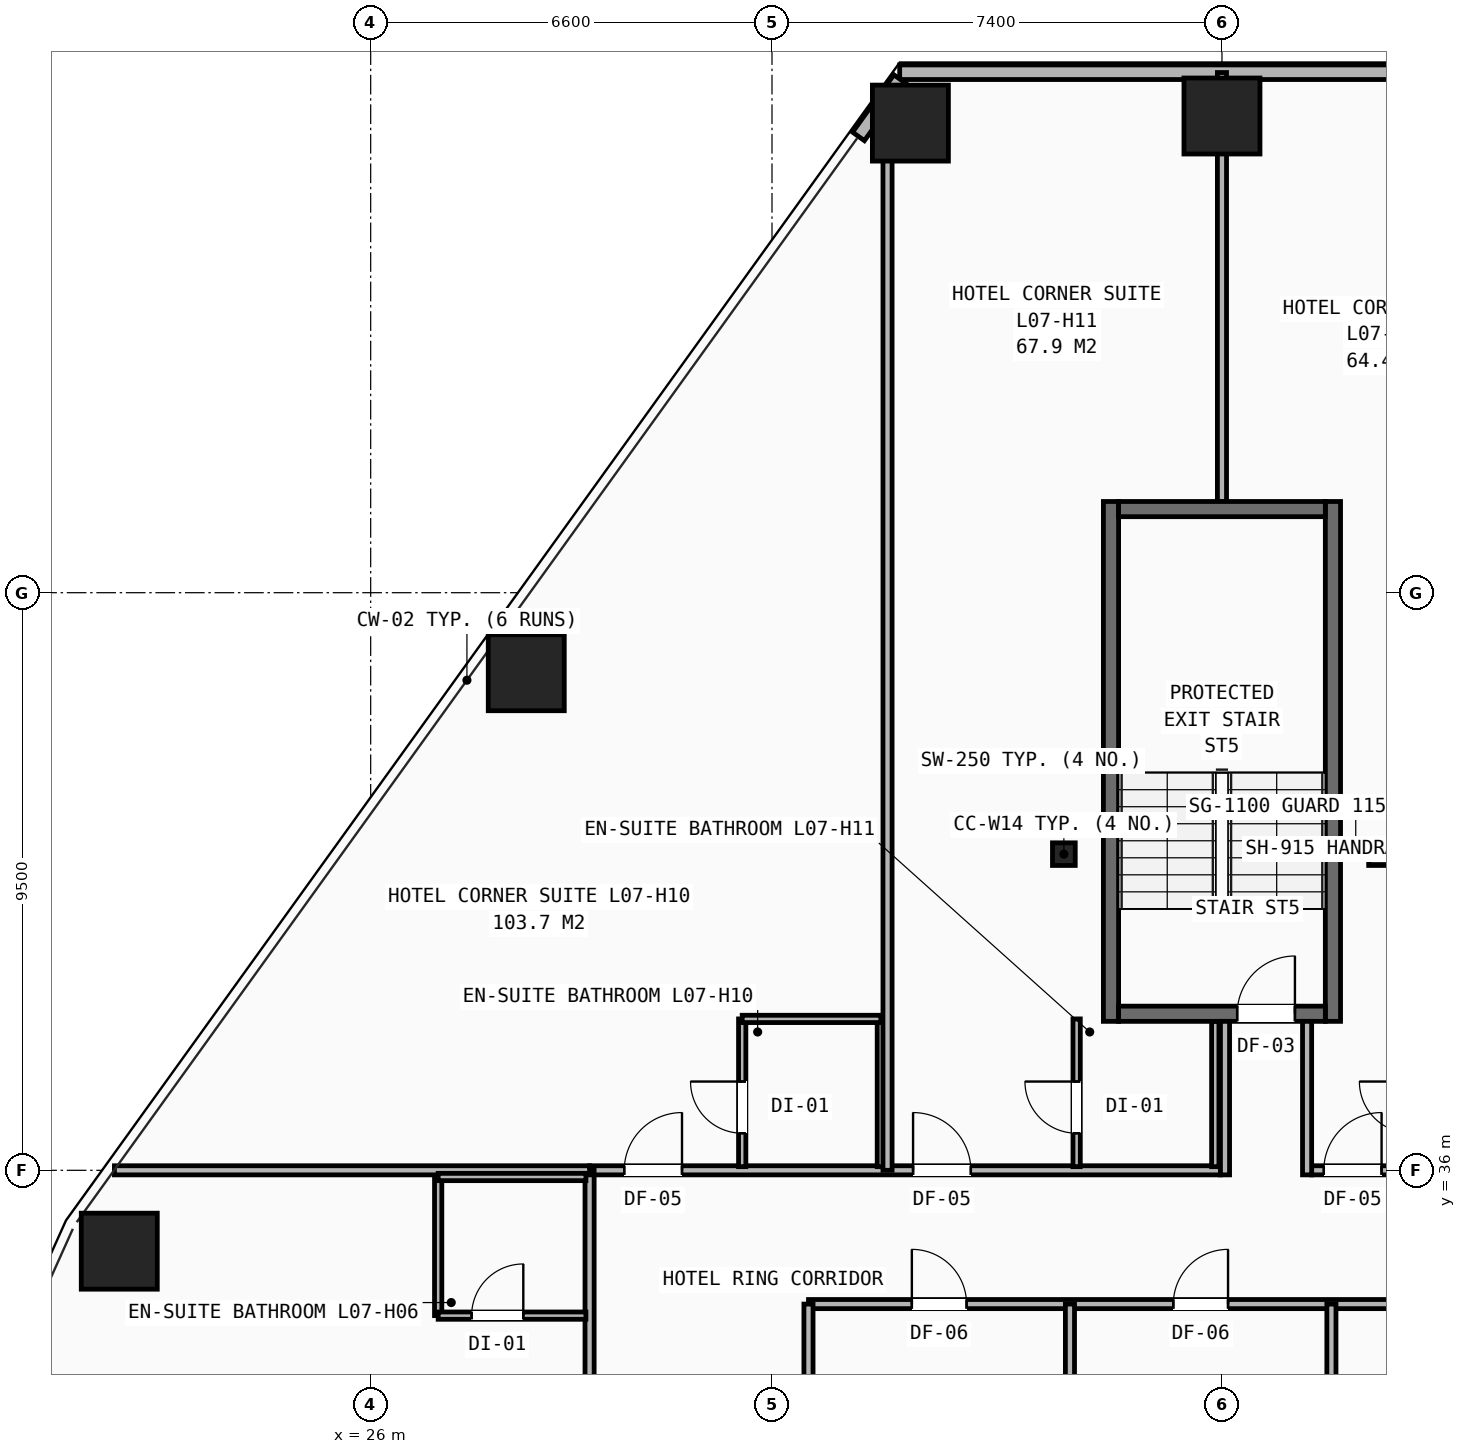
"""IFC4 building model, lengths in metres.
Left out: names, types, materials, properties, quantities, classifications, styles, units other than length and angle.
Written with IfcOpenShell. Run it as: python <this file> out.ifc"""

import sys

from ifc_helpers import new_model, si_unit, direction, frame, frame_2d, origin, origin_2d, place, context, subcontext, project, spatial, rectangle, hollow_rectangle, i_section, extrude, element, fill, save


model = new_model("IFC4")
c1 = context("Model", 3, precision=1e-05, world=origin(), true_north=direction((0.0, 1.0)))
c2 = subcontext(c1, "Body", "Model", "MODEL_VIEW")
j1 = project(units=[si_unit("LENGTHUNIT", "METRE"), si_unit("PLANEANGLEUNIT", "RADIAN")], contexts=[c1])
p1 = place(None, origin())
s1 = spatial("IfcSite", under=j1, at=p1, CompositionType="ELEMENT")
p2 = place(p1, origin())
s2 = spatial("IfcBuilding", under=s1, at=p2, CompositionType="ELEMENT")
p3 = place(p2, frame((0.0, 0.0, 30.4)))
s3 = spatial("IfcBuildingStorey", under=s2, at=p3, CompositionType="ELEMENT", Elevation=30.4)
for number, where, z_axis, x_axis in (
    (1, (37.4, 41.2, 0.0), (0.0, 0.0, 1.0), (1.0, 0.0, 0.0)),
    (2, (42.6, 41.2, 0.0), (0.0, 0.0, 1.0), (1.0, 0.0, 0.0)),
):
    element("IfcColumn", number, at=place(p3, frame(where, z_axis=z_axis, x_axis=x_axis)), inside=s3, PredefinedType="COLUMN", context=c2, shape_type="SweptSolid", body=[
        extrude(i_section(OverallWidth=0.374, OverallDepth=0.372, WebThickness=0.016, FlangeThickness=0.026, at=origin_2d()), origin(), (0.0, 0.0, 1.0), 3.2),
    ])
for number, where, z_axis, x_axis in (
    (3, (40.0, 53.34, 0.0), (0.0, 0.0, 1.0), (1.0, 0.0, 0.0)),
    (4, (34.876, 53.223, 0.0), (0.0, 0.0, 1.0), (1.0, 0.0, 0.0)),
    (5, (28.559, 44.184, 0.0), (0.0, 0.0, 1.0), (1.0, 0.0, 0.0)),
    (6, (21.865, 34.67, 0.0), (0.0, 0.0, 1.0), (1.0, 0.0, 0.0)),
):
    element("IfcColumn", number, at=place(p3, frame(where, z_axis=z_axis, x_axis=x_axis)), inside=s3, PredefinedType="COLUMN", context=c2, shape_type="SweptSolid", body=[
        extrude(hollow_rectangle(XDim=1.25, YDim=1.25, WallThickness=0.08, at=origin_2d()), origin(), (0.0, 0.0, 1.0), 3.2),
    ])
p4 = place(p3, frame((34.7, 54.06, 0.0), z_axis=(0.0, 0.0, 1.0), x_axis=(1.0, 0.0, 0.0)))
e7 = element("IfcWall", 7, at=p4, inside=s3, PredefinedType="SHEAR", context=c2, shape_type="SweptSolid", body=[
    extrude(rectangle(XDim=10.6, YDim=0.24, at=frame_2d((5.3, 0.0))), origin(), (0.0, 0.0, 1.0), 2.263),
])
p5 = place(p3, frame((34.701, 53.948, 0.0), z_axis=(0.0, 0.0, 1.0), x_axis=(-0.584293660118, -0.811542308661, 0.0)))
e8 = element("IfcWall", 8, at=p5, inside=s3, PredefinedType="SHEAR", context=c2, shape_type="SweptSolid", body=[
    extrude(rectangle(XDim=1.162, YDim=0.24, at=frame_2d((0.581, 0.0))), origin(), (0.0, 0.0, 1.0), 2.263),
])
p6 = place(p3, frame((33.2, 33.8, 0.0), z_axis=(0.0, 0.0, 1.0), x_axis=(1.0, 0.0, 0.0)))
e9 = element("IfcWall", 9, at=p6, inside=s3, PredefinedType="PARTITIONING", context=c2, shape_type="SweptSolid", body=[
    extrude(rectangle(XDim=13.0, YDim=0.15, at=frame_2d((6.5, 0.0))), origin(), (0.0, 0.0, 1.0), 2.98),
])
p7 = place(p6, frame((1.7, 0.0, 0.0)))
e10 = element("IfcOpeningElement", 10, at=p7, cuts=e9, PredefinedType="OPENING", context=c2, shape_type="SweptSolid", body=[
    extrude(rectangle(XDim=0.9, YDim=2.1, at=frame_2d((0.45, 1.05))), frame((0.0, 0.085, 0.0), z_axis=(0.0, -1.0, 0.0), x_axis=(1.0, 0.0, 0.0)), (0.0, 0.0, 1.0), 0.17),
])
p8 = place(p6, frame((6.0, 0.0, 0.0)))
e11 = element("IfcOpeningElement", 11, at=p8, cuts=e9, PredefinedType="OPENING", context=c2, shape_type="SweptSolid", body=[
    extrude(rectangle(XDim=0.9, YDim=2.1, at=frame_2d((0.45, 1.05))), frame((0.0, 0.085, 0.0), z_axis=(0.0, -1.0, 0.0), x_axis=(1.0, 0.0, 0.0)), (0.0, 0.0, 1.0), 0.17),
])
p9 = place(p6, frame((10.35, 0.0, 0.0)))
e12 = element("IfcOpeningElement", 12, at=p9, cuts=e9, PredefinedType="OPENING", context=c2, shape_type="SweptSolid", body=[
    extrude(rectangle(XDim=0.9, YDim=2.1, at=frame_2d((0.45, 1.05))), frame((0.0, 0.085, 0.0), z_axis=(0.0, -1.0, 0.0), x_axis=(1.0, 0.0, 0.0)), (0.0, 0.0, 1.0), 0.17),
])
for number, where, z_axis, x_axis in (
    (13, (33.2, 31.2, 0.0), (0.0, 0.0, 1.0), (0.0, 1.0, 0.0)),
    (14, (37.5, 31.2, 0.0), (0.0, 0.0, 1.0), (0.0, 1.0, 0.0)),
    (15, (41.8, 31.2, 0.0), (0.0, 0.0, 1.0), (0.0, 1.0, 0.0)),
):
    element("IfcWall", number, at=place(p3, frame(where, z_axis=z_axis, x_axis=x_axis)), inside=s3, PredefinedType="PARTITIONING", context=c2, shape_type="SweptSolid", body=[
        extrude(rectangle(XDim=2.6, YDim=0.15, at=frame_2d((1.3, 0.0))), origin(), (0.0, 0.0, 1.0), 2.431),
    ])
p10 = place(p3, frame((29.6, 36.0, 0.0), z_axis=(0.0, 0.0, 1.0), x_axis=(1.0, 0.0, 0.0)))
e16 = element("IfcWall", 16, at=p10, inside=s3, PredefinedType="PARTITIONING", context=c2, shape_type="SweptSolid", body=[
    extrude(rectangle(XDim=10.375, YDim=0.15, at=frame_2d((5.188, 0.0))), origin(), (0.0, 0.0, 1.0), 2.98),
])
p11 = place(p10, frame((0.57, 0.0, 0.0)))
e17 = element("IfcOpeningElement", 17, at=p11, cuts=e16, PredefinedType="OPENING", context=c2, shape_type="SweptSolid", body=[
    extrude(rectangle(XDim=0.95, YDim=2.1, at=frame_2d((0.475, 1.05))), frame((0.0, 0.085, 0.0), z_axis=(0.0, -1.0, 0.0), x_axis=(1.0, 0.0, 0.0)), (0.0, 0.0, 1.0), 0.17),
])
p12 = place(p10, frame((5.32, 0.0, 0.0)))
e18 = element("IfcOpeningElement", 18, at=p12, cuts=e16, PredefinedType="OPENING", context=c2, shape_type="SweptSolid", body=[
    extrude(rectangle(XDim=0.95, YDim=2.1, at=frame_2d((0.475, 1.05))), frame((0.0, 0.085, 0.0), z_axis=(0.0, -1.0, 0.0), x_axis=(1.0, 0.0, 0.0)), (0.0, 0.0, 1.0), 0.17),
])
p13 = place(p3, frame((41.475, 36.0, 0.0), z_axis=(0.0, 0.0, 1.0), x_axis=(1.0, 0.0, 0.0)))
e19 = element("IfcWall", 19, at=p13, inside=s3, PredefinedType="PARTITIONING", context=c2, shape_type="SweptSolid", body=[
    extrude(rectangle(XDim=8.925, YDim=0.15, at=frame_2d((4.462, 0.0))), origin(), (0.0, 0.0, 1.0), 2.513),
])
p14 = place(p13, frame((0.2, 0.0, 0.0)))
e20 = element("IfcOpeningElement", 20, at=p14, cuts=e19, PredefinedType="OPENING", context=c2, shape_type="SweptSolid", body=[
    extrude(rectangle(XDim=0.95, YDim=2.1, at=frame_2d((0.475, 1.05))), frame((0.0, 0.085, 0.0), z_axis=(0.0, -1.0, 0.0), x_axis=(1.0, 0.0, 0.0)), (0.0, 0.0, 1.0), 0.17),
])
p15 = place(p13, frame((4.445, 0.0, 0.0)))
e21 = element("IfcOpeningElement", 21, at=p15, cuts=e19, PredefinedType="OPENING", context=c2, shape_type="SweptSolid", body=[
    extrude(rectangle(XDim=0.95, YDim=2.1, at=frame_2d((0.475, 1.05))), frame((0.0, 0.085, 0.0), z_axis=(0.0, -1.0, 0.0), x_axis=(1.0, 0.0, 0.0)), (0.0, 0.0, 1.0), 0.17),
])
p16 = place(p3, frame((29.6, 14.1, 0.0), z_axis=(0.0, 0.0, 1.0), x_axis=(0.0, 1.0, 0.0)))
e22 = element("IfcWall", 22, at=p16, inside=s3, PredefinedType="PARTITIONING", context=c2, shape_type="SweptSolid", body=[
    extrude(rectangle(XDim=21.9, YDim=0.15, at=frame_2d((10.95, 0.0))), origin(), (0.0, 0.0, 1.0), 2.431),
])
p17 = place(p16, frame((0.42, 0.0, 0.0)))
e23 = element("IfcOpeningElement", 23, at=p17, cuts=e22, PredefinedType="OPENING", context=c2, shape_type="SweptSolid", body=[
    extrude(rectangle(XDim=0.95, YDim=2.1, at=frame_2d((0.475, 1.05))), frame((0.0, 0.085, 0.0), z_axis=(0.0, -1.0, 0.0), x_axis=(1.0, 0.0, 0.0)), (0.0, 0.0, 1.0), 0.17),
])
p18 = place(p16, frame((6.82, 0.0, 0.0)))
e24 = element("IfcOpeningElement", 24, at=p18, cuts=e22, PredefinedType="OPENING", context=c2, shape_type="SweptSolid", body=[
    extrude(rectangle(XDim=0.95, YDim=2.1, at=frame_2d((0.475, 1.05))), frame((0.0, 0.085, 0.0), z_axis=(0.0, -1.0, 0.0), x_axis=(1.0, 0.0, 0.0)), (0.0, 0.0, 1.0), 0.17),
])
p19 = place(p16, frame((14.32, 0.0, 0.0)))
e25 = element("IfcOpeningElement", 25, at=p19, cuts=e22, PredefinedType="OPENING", context=c2, shape_type="SweptSolid", body=[
    extrude(rectangle(XDim=0.95, YDim=2.1, at=frame_2d((0.475, 1.05))), frame((0.0, 0.085, 0.0), z_axis=(0.0, -1.0, 0.0), x_axis=(1.0, 0.0, 0.0)), (0.0, 0.0, 1.0), 0.17),
])
p20 = place(p3, frame((21.786, 36.0, 0.0), z_axis=(0.0, 0.0, 1.0), x_axis=(1.0, 0.0, 0.0)))
e26 = element("IfcWall", 26, at=p20, inside=s3, PredefinedType="PARTITIONING", context=c2, shape_type="SweptSolid", body=[
    extrude(rectangle(XDim=7.814, YDim=0.15, at=frame_2d((3.907, 0.0))), origin(), (0.0, 0.0, 1.0), 2.268),
])
p21 = place(p3, frame((27.11, 33.61, 0.0), z_axis=(0.0, 0.0, 1.0), x_axis=(0.0, 1.0, 0.0)))
e27 = element("IfcWall", 27, at=p21, inside=s3, PredefinedType="PARTITIONING", context=c2, shape_type="SweptSolid", body=[
    extrude(rectangle(XDim=2.28, YDim=0.12, at=frame_2d((1.14, 0.0))), origin(), (0.0, 0.0, 1.0), 2.513),
])
p22 = place(p3, frame((27.11, 33.61, 0.0), z_axis=(0.0, 0.0, 1.0), x_axis=(1.0, 0.0, 0.0)))
e28 = element("IfcWall", 28, at=p22, inside=s3, PredefinedType="PARTITIONING", context=c2, shape_type="SweptSolid", body=[
    extrude(rectangle(XDim=2.43, YDim=0.12, at=frame_2d((1.215, 0.0))), origin(), (0.0, 0.0, 1.0), 2.98),
])
p23 = place(p22, frame((0.55, 0.0, 0.0)))
e29 = element("IfcOpeningElement", 29, at=p23, cuts=e28, PredefinedType="OPENING", context=c2, shape_type="SweptSolid", body=[
    extrude(rectangle(XDim=0.85, YDim=2.05, at=frame_2d((0.425, 1.025))), frame((0.0, 0.07, 0.0), z_axis=(0.0, -1.0, 0.0), x_axis=(1.0, 0.0, 0.0)), (0.0, 0.0, 1.0), 0.14),
])
p24 = place(p3, frame((27.11, 35.89, 0.0), z_axis=(0.0, 0.0, 1.0), x_axis=(1.0, 0.0, 0.0)))
e30 = element("IfcWall", 30, at=p24, inside=s3, PredefinedType="PARTITIONING", context=c2, shape_type="SweptSolid", body=[
    extrude(rectangle(XDim=2.43, YDim=0.12, at=frame_2d((1.215, 0.0))), origin(), (0.0, 0.0, 1.0), 2.513),
])
p25 = place(p3, frame((32.11, 36.06, 0.0), z_axis=(0.0, 0.0, 1.0), x_axis=(0.0, 1.0, 0.0)))
e31 = element("IfcWall", 31, at=p25, inside=s3, PredefinedType="PARTITIONING", context=c2, shape_type="SweptSolid", body=[
    extrude(rectangle(XDim=2.43, YDim=0.12, at=frame_2d((1.215, 0.0))), origin(), (0.0, 0.0, 1.0), 2.98),
])
p26 = place(p25, frame((0.55, 0.0, 0.0)))
e32 = element("IfcOpeningElement", 32, at=p26, cuts=e31, PredefinedType="OPENING", context=c2, shape_type="SweptSolid", body=[
    extrude(rectangle(XDim=0.85, YDim=2.05, at=frame_2d((0.425, 1.025))), frame((0.0, 0.07, 0.0), z_axis=(0.0, -1.0, 0.0), x_axis=(1.0, 0.0, 0.0)), (0.0, 0.0, 1.0), 0.14),
])
p27 = place(p3, frame((34.39, 36.06, 0.0), z_axis=(0.0, 0.0, 1.0), x_axis=(0.0, 1.0, 0.0)))
e33 = element("IfcWall", 33, at=p27, inside=s3, PredefinedType="PARTITIONING", context=c2, shape_type="SweptSolid", body=[
    extrude(rectangle(XDim=2.43, YDim=0.12, at=frame_2d((1.215, 0.0))), origin(), (0.0, 0.0, 1.0), 2.98),
])
p28 = place(p3, frame((32.11, 38.49, 0.0), z_axis=(0.0, 0.0, 1.0), x_axis=(1.0, 0.0, 0.0)))
e34 = element("IfcWall", 34, at=p28, inside=s3, PredefinedType="PARTITIONING", context=c2, shape_type="SweptSolid", body=[
    extrude(rectangle(XDim=2.28, YDim=0.12, at=frame_2d((1.14, 0.0))), origin(), (0.0, 0.0, 1.0), 2.98),
])
p29 = place(p3, frame((34.5, 36.0, 0.0), z_axis=(0.0, 0.0, 1.0), x_axis=(0.0, 1.0, 0.0)))
e35 = element("IfcWall", 35, at=p29, inside=s3, PredefinedType="PARTITIONING", context=c2, shape_type="SweptSolid", body=[
    extrude(rectangle(XDim=17.66, YDim=0.15, at=frame_2d((8.83, 0.0))), origin(), (0.0, 0.0, 1.0), 2.268),
])
p30 = place(p3, frame((37.61, 36.06, 0.0), z_axis=(0.0, 0.0, 1.0), x_axis=(0.0, 1.0, 0.0)))
e36 = element("IfcWall", 36, at=p30, inside=s3, PredefinedType="PARTITIONING", context=c2, shape_type="SweptSolid", body=[
    extrude(rectangle(XDim=2.43, YDim=0.12, at=frame_2d((1.215, 0.0))), origin(), (0.0, 0.0, 1.0), 2.98),
])
p31 = place(p30, frame((0.55, 0.0, 0.0)))
e37 = element("IfcOpeningElement", 37, at=p31, cuts=e36, PredefinedType="OPENING", context=c2, shape_type="SweptSolid", body=[
    extrude(rectangle(XDim=0.85, YDim=2.05, at=frame_2d((0.425, 1.025))), frame((0.0, 0.07, 0.0), z_axis=(0.0, -1.0, 0.0), x_axis=(1.0, 0.0, 0.0)), (0.0, 0.0, 1.0), 0.14),
])
p32 = place(p3, frame((39.89, 36.06, 0.0), z_axis=(0.0, 0.0, 1.0), x_axis=(0.0, 1.0, 0.0)))
e38 = element("IfcWall", 38, at=p32, inside=s3, PredefinedType="PARTITIONING", context=c2, shape_type="SweptSolid", body=[
    extrude(rectangle(XDim=2.39, YDim=0.12, at=frame_2d((1.195, 0.0))), origin(), (0.0, 0.0, 1.0), 2.98),
])
p33 = place(p3, frame((40.0, 47.0, 0.0), z_axis=(0.0, 0.0, 1.0), x_axis=(0.0, 1.0, 0.0)))
e39 = element("IfcWall", 39, at=p33, inside=s3, PredefinedType="PARTITIONING", context=c2, shape_type="SweptSolid", body=[
    extrude(rectangle(XDim=7.055, YDim=0.15, at=frame_2d((3.528, 0.0))), origin(), (0.0, 0.0, 1.0), 2.268),
])
for number, where, z_axis, x_axis in (
    (40, (38.175, 38.45, 0.0), (0.0, 0.0, 1.0), (0.0, 1.0, 0.0)),
    (41, (41.825, 38.45, 0.0), (0.0, 0.0, 1.0), (0.0, 1.0, 0.0)),
):
    element("IfcWall", number, at=place(p3, frame(where, z_axis=z_axis, x_axis=x_axis)), inside=s3, PredefinedType="SHEAR", context=c2, shape_type="SweptSolid", body=[
        extrude(rectangle(XDim=8.55, YDim=0.25, at=frame_2d((4.275, 0.0))), origin(), (0.0, 0.0, 1.0), 2.98),
    ])
p34 = place(p3, frame((38.3, 38.575, 0.0), z_axis=(0.0, 0.0, 1.0), x_axis=(1.0, 0.0, 0.0)))
e42 = element("IfcWall", 42, at=p34, inside=s3, PredefinedType="SHEAR", context=c2, shape_type="SweptSolid", body=[
    extrude(rectangle(XDim=3.4, YDim=0.25, at=frame_2d((1.7, 0.0))), origin(), (0.0, 0.0, 1.0), 2.98),
])
p35 = place(p34, frame((1.95, 0.0, 0.0)))
e43 = element("IfcOpeningElement", 43, at=p35, cuts=e42, PredefinedType="OPENING", context=c2, shape_type="SweptSolid", body=[
    extrude(rectangle(XDim=0.95, YDim=2.1, at=frame_2d((0.475, 1.05))), frame((0.0, 0.135, 0.0), z_axis=(0.0, -1.0, 0.0), x_axis=(1.0, 0.0, 0.0)), (0.0, 0.0, 1.0), 0.27),
])
p36 = place(p3, frame((38.3, 46.875, 0.0), z_axis=(0.0, 0.0, 1.0), x_axis=(1.0, 0.0, 0.0)))
e44 = element("IfcWall", 44, at=p36, inside=s3, PredefinedType="SHEAR", context=c2, shape_type="SweptSolid", body=[
    extrude(rectangle(XDim=3.4, YDim=0.25, at=frame_2d((1.7, 0.0))), origin(), (0.0, 0.0, 1.0), 2.98),
])
for number, where, z_axis, x_axis in (
    (45, (40.05, 35.925, 0.0), (0.0, 0.0, 1.0), (0.0, 1.0, 0.0)),
    (46, (41.4, 35.925, 0.0), (0.0, 0.0, 1.0), (0.0, 1.0, 0.0)),
):
    element("IfcWall", number, at=place(p3, frame(where, z_axis=z_axis, x_axis=x_axis)), inside=s3, PredefinedType="PARTITIONING", context=c2, shape_type="SweptSolid", body=[
        extrude(rectangle(XDim=2.525, YDim=0.15, at=frame_2d((1.262, 0.0))), origin(), (0.0, 0.0, 1.0), 2.98),
    ])
p37 = place(p7, origin())
e47 = element("IfcDoor", 47, at=p37, inside=s3, OperationType="SINGLE_SWING_LEFT", PredefinedType="DOOR", context=c2, shape_type="SweptSolid", body=[
    extrude(rectangle(XDim=0.9, YDim=2.1, at=frame_2d((0.45, 1.05))), frame((0.0, 0.025, 0.0), z_axis=(0.0, -1.0, 0.0), x_axis=(1.0, 0.0, 0.0)), (0.0, 0.0, 1.0), 0.05),
])
fill(e10, e47)
p38 = place(p8, origin())
e48 = element("IfcDoor", 48, at=p38, inside=s3, OperationType="SINGLE_SWING_RIGHT", PredefinedType="DOOR", context=c2, shape_type="SweptSolid", body=[
    extrude(rectangle(XDim=0.9, YDim=2.1, at=frame_2d((0.45, 1.05))), frame((0.0, 0.025, 0.0), z_axis=(0.0, -1.0, 0.0), x_axis=(1.0, 0.0, 0.0)), (0.0, 0.0, 1.0), 0.05),
])
fill(e11, e48)
p39 = place(p23, origin())
e49 = element("IfcDoor", 49, at=p39, inside=s3, OperationType="SINGLE_SWING_RIGHT", PredefinedType="DOOR", context=c2, shape_type="SweptSolid", body=[
    extrude(rectangle(XDim=0.85, YDim=2.05, at=frame_2d((0.425, 1.025))), frame((0.0, 0.025, 0.0), z_axis=(0.0, -1.0, 0.0), x_axis=(1.0, 0.0, 0.0)), (0.0, 0.0, 1.0), 0.05),
])
fill(e29, e49)
p40 = place(p11, origin())
e50 = element("IfcDoor", 50, at=p40, inside=s3, OperationType="SINGLE_SWING_RIGHT", PredefinedType="DOOR", context=c2, shape_type="SweptSolid", body=[
    extrude(rectangle(XDim=0.95, YDim=2.1, at=frame_2d((0.475, 1.05))), frame((0.0, 0.025, 0.0), z_axis=(0.0, -1.0, 0.0), x_axis=(1.0, 0.0, 0.0)), (0.0, 0.0, 1.0), 0.05),
])
fill(e17, e50)
p41 = place(p26, origin())
e51 = element("IfcDoor", 51, at=p41, inside=s3, OperationType="SINGLE_SWING_RIGHT", PredefinedType="DOOR", context=c2, shape_type="SweptSolid", body=[
    extrude(rectangle(XDim=0.85, YDim=2.05, at=frame_2d((0.425, 1.025))), frame((0.0, 0.025, 0.0), z_axis=(0.0, -1.0, 0.0), x_axis=(1.0, 0.0, 0.0)), (0.0, 0.0, 1.0), 0.05),
])
fill(e32, e51)
p42 = place(p12, origin())
e52 = element("IfcDoor", 52, at=p42, inside=s3, OperationType="SINGLE_SWING_LEFT", PredefinedType="DOOR", context=c2, shape_type="SweptSolid", body=[
    extrude(rectangle(XDim=0.95, YDim=2.1, at=frame_2d((0.475, 1.05))), frame((0.0, 0.025, 0.0), z_axis=(0.0, -1.0, 0.0), x_axis=(1.0, 0.0, 0.0)), (0.0, 0.0, 1.0), 0.05),
])
fill(e18, e52)
p43 = place(p31, origin())
e53 = element("IfcDoor", 53, at=p43, inside=s3, OperationType="SINGLE_SWING_RIGHT", PredefinedType="DOOR", context=c2, shape_type="SweptSolid", body=[
    extrude(rectangle(XDim=0.85, YDim=2.05, at=frame_2d((0.425, 1.025))), frame((0.0, 0.025, 0.0), z_axis=(0.0, -1.0, 0.0), x_axis=(1.0, 0.0, 0.0)), (0.0, 0.0, 1.0), 0.05),
])
fill(e37, e53)
p44 = place(p14, origin())
e54 = element("IfcDoor", 54, at=p44, inside=s3, OperationType="SINGLE_SWING_RIGHT", PredefinedType="DOOR", context=c2, shape_type="SweptSolid", body=[
    extrude(rectangle(XDim=0.95, YDim=2.1, at=frame_2d((0.475, 1.05))), frame((0.0, 0.025, 0.0), z_axis=(0.0, -1.0, 0.0), x_axis=(1.0, 0.0, 0.0)), (0.0, 0.0, 1.0), 0.05),
])
fill(e20, e54)
p45 = place(p35, origin())
e55 = element("IfcDoor", 55, at=p45, inside=s3, OperationType="SINGLE_SWING_RIGHT", PredefinedType="DOOR", context=c2, shape_type="SweptSolid", body=[
    extrude(rectangle(XDim=0.95, YDim=2.1, at=frame_2d((0.475, 1.05))), frame((0.0, 0.025, 0.0), z_axis=(0.0, -1.0, 0.0), x_axis=(1.0, 0.0, 0.0)), (0.0, 0.0, 1.0), 0.05),
])
fill(e43, e55)
save(model, sys.argv[1])
